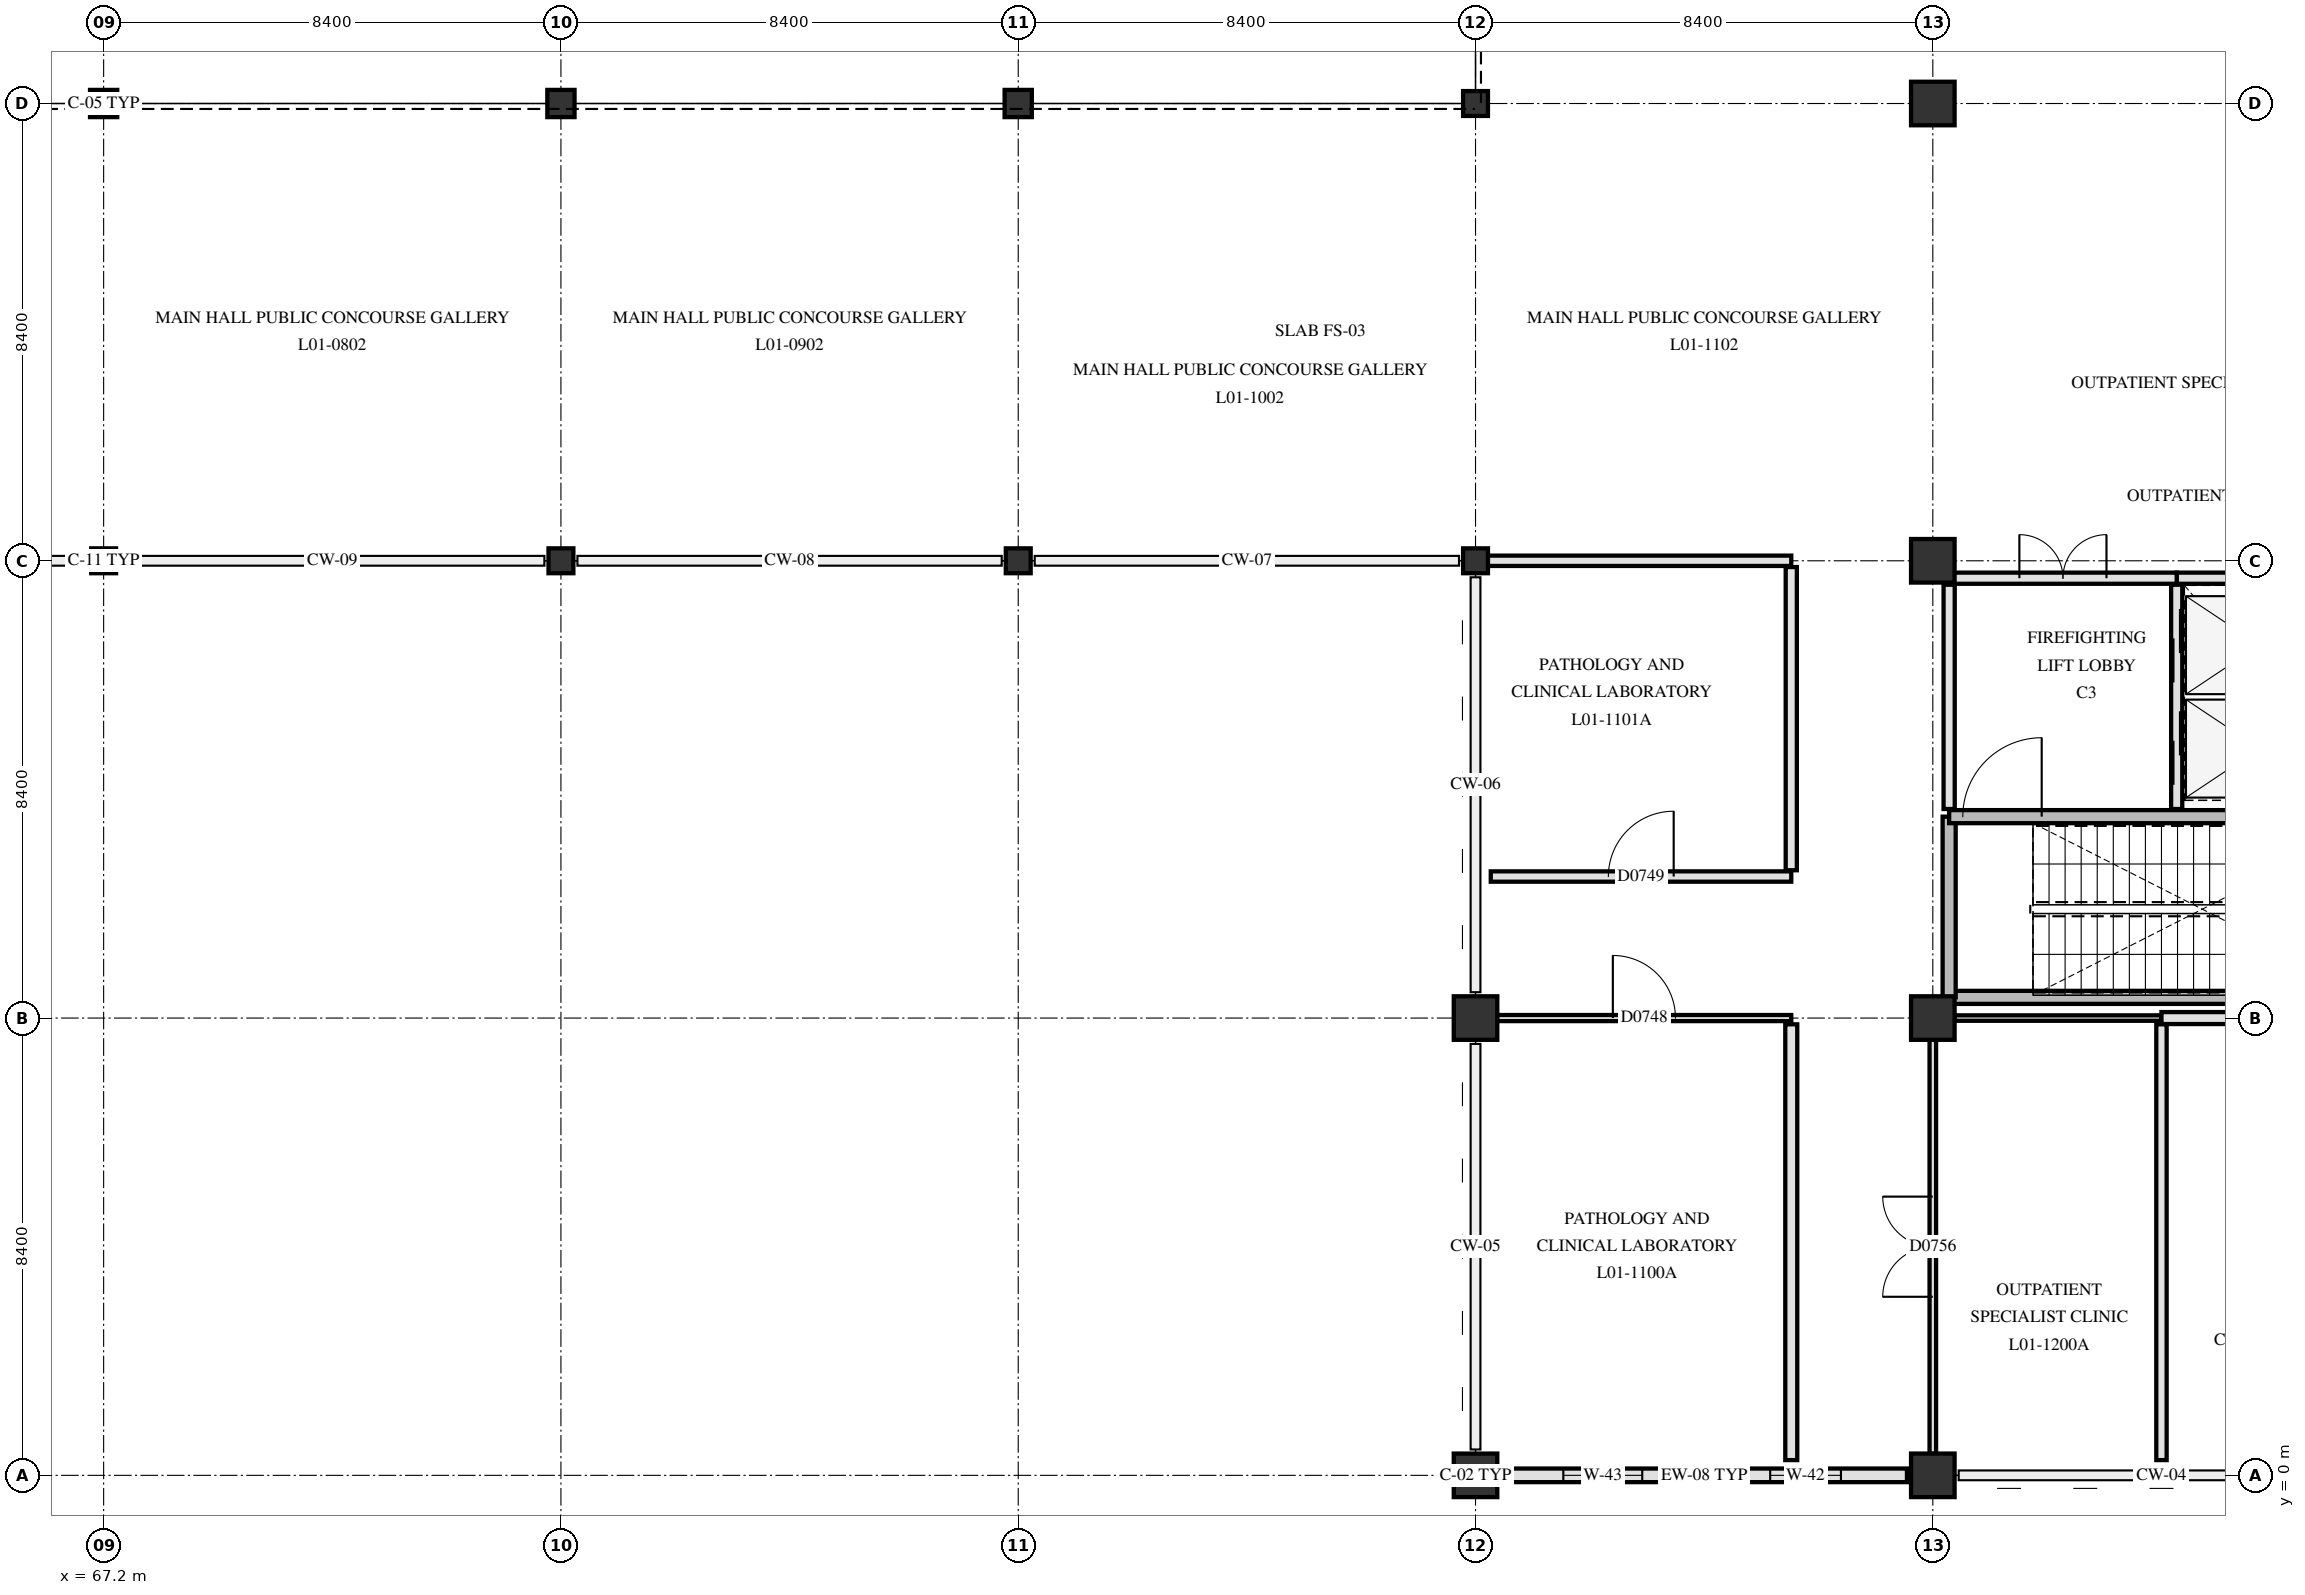
"""IFC4 building model, lengths in metres.
Left out: names, types, materials, properties, quantities, classifications, styles, units other than length and angle.
Written with IfcOpenShell. Run it as: python <this file> out.ifc"""

import sys

from ifc_helpers import new_model, si_unit, direction, frame, frame_2d, origin, origin_2d, place, context, subcontext, project, spatial, rectangle, hollow_circle, extrude, element, fill, save


model = new_model("IFC4")
c1 = context("Model", 3, precision=1e-05, world=origin(), true_north=direction((0.0, 1.0)))
c2 = subcontext(c1, "Body", "Model", "MODEL_VIEW")
j1 = project(units=[si_unit("LENGTHUNIT", "METRE"), si_unit("PLANEANGLEUNIT", "RADIAN")], contexts=[c1])
p1 = place(None, origin())
s1 = spatial("IfcSite", under=j1, at=p1, CompositionType="ELEMENT")
p2 = place(p1, origin())
s2 = spatial("IfcBuilding", under=s1, at=p2, CompositionType="ELEMENT")
p3 = place(p2, frame((0.0, 0.0, 4.8)))
s3 = spatial("IfcBuildingStorey", under=s2, at=p3, CompositionType="ELEMENT", Elevation=4.8)
p4 = place(p3, frame((67.2, 16.8, 0.0), z_axis=(0.0, 0.0, 1.0), x_axis=(1.0, 0.0, 0.0)))
e1 = element("IfcColumn", 1, at=p4, inside=s3, PredefinedType="COLUMN", context=c2, shape_type="SweptSolid", body=[
    extrude(hollow_circle(Radius=0.229, WallThickness=0.02, at=origin_2d()), origin(), (0.0, 0.0, 1.0), 4.5),
])
p5 = place(p3, frame((67.2, 25.2, 0.0), z_axis=(0.0, 0.0, 1.0), x_axis=(1.0, 0.0, 0.0)))
e2 = element("IfcColumn", 2, at=p5, inside=s3, PredefinedType="COLUMN", context=c2, shape_type="SweptSolid", body=[
    extrude(rectangle(XDim=0.5, YDim=0.5, at=origin_2d()), origin(), (0.0, 0.0, 1.0), 4.5),
])
p6 = place(p3, frame((75.6, 16.8, 0.0), z_axis=(0.0, 0.0, 1.0), x_axis=(1.0, 0.0, 0.0)))
e3 = element("IfcColumn", 3, at=p6, inside=s3, PredefinedType="COLUMN", context=c2, shape_type="SweptSolid", body=[
    extrude(hollow_circle(Radius=0.229, WallThickness=0.02, at=origin_2d()), origin(), (0.0, 0.0, 1.0), 4.5),
])
p7 = place(p3, frame((75.6, 25.2, 0.0), z_axis=(0.0, 0.0, 1.0), x_axis=(1.0, 0.0, 0.0)))
e4 = element("IfcColumn", 4, at=p7, inside=s3, PredefinedType="COLUMN", context=c2, shape_type="SweptSolid", body=[
    extrude(rectangle(XDim=0.5, YDim=0.5, at=origin_2d()), origin(), (0.0, 0.0, 1.0), 4.5),
])
p8 = place(p3, frame((84.0, 16.8, 0.0), z_axis=(0.0, 0.0, 1.0), x_axis=(1.0, 0.0, 0.0)))
e5 = element("IfcColumn", 5, at=p8, inside=s3, PredefinedType="COLUMN", context=c2, shape_type="SweptSolid", body=[
    extrude(hollow_circle(Radius=0.229, WallThickness=0.02, at=origin_2d()), origin(), (0.0, 0.0, 1.0), 4.5),
])
p9 = place(p3, frame((84.0, 25.2, 0.0), z_axis=(0.0, 0.0, 1.0), x_axis=(1.0, 0.0, 0.0)))
e6 = element("IfcColumn", 6, at=p9, inside=s3, PredefinedType="COLUMN", context=c2, shape_type="SweptSolid", body=[
    extrude(rectangle(XDim=0.5, YDim=0.5, at=origin_2d()), origin(), (0.0, 0.0, 1.0), 4.5),
])
for number, where, z_axis, x_axis in (
    (7, (92.4, 0.0, 0.0), (0.0, 0.0, 1.0), (1.0, 0.0, 0.0)),
    (8, (92.4, 8.4, 0.0), (0.0, 0.0, 1.0), (1.0, 0.0, 0.0)),
):
    element("IfcColumn", number, at=place(p3, frame(where, z_axis=z_axis, x_axis=x_axis)), inside=s3, PredefinedType="COLUMN", context=c2, shape_type="SweptSolid", body=[
        extrude(rectangle(XDim=0.8, YDim=0.8, at=origin_2d()), origin(), (0.0, 0.0, 1.0), 4.5),
    ])
for number, where, z_axis, x_axis in (
    (9, (92.4, 16.8, 0.0), (0.0, 0.0, 1.0), (1.0, 0.0, 0.0)),
    (10, (92.4, 25.2, 0.0), (0.0, 0.0, 1.0), (1.0, 0.0, 0.0)),
):
    element("IfcColumn", number, at=place(p3, frame(where, z_axis=z_axis, x_axis=x_axis)), inside=s3, PredefinedType="COLUMN", context=c2, shape_type="SweptSolid", body=[
        extrude(hollow_circle(Radius=0.229, WallThickness=0.02, at=origin_2d()), origin(), (0.0, 0.0, 1.0), 4.5),
    ])
for number, where, z_axis, x_axis in (
    (11, (100.8, 0.0, 0.0), (0.0, 0.0, 1.0), (1.0, 0.0, 0.0)),
    (12, (100.8, 8.4, 0.0), (0.0, 0.0, 1.0), (1.0, 0.0, 0.0)),
    (13, (100.8, 16.8, 0.0), (0.0, 0.0, 1.0), (1.0, 0.0, 0.0)),
    (14, (100.8, 25.2, 0.0), (0.0, 0.0, 1.0), (1.0, 0.0, 0.0)),
):
    element("IfcColumn", number, at=place(p3, frame(where, z_axis=z_axis, x_axis=x_axis)), inside=s3, PredefinedType="COLUMN", context=c2, shape_type="SweptSolid", body=[
        extrude(rectangle(XDim=0.8, YDim=0.8, at=origin_2d()), origin(), (0.0, 0.0, 1.0), 4.5),
    ])
p10 = place(p3, frame((100.325, 0.0, 0.0), z_axis=(0.0, 0.0, 1.0), x_axis=(-1.0, 0.0, 0.0)))
e15 = element("IfcWall", 15, at=p10, inside=s3, PredefinedType="SOLIDWALL", context=c2, shape_type="SweptSolid", body=[
    extrude(rectangle(XDim=7.45, YDim=0.25, at=frame_2d((3.725, 0.0))), origin(), (0.0, 0.0, 1.0), 3.44),
])
p11 = place(p10, frame((1.212, 0.0, 0.85)))
e16 = element("IfcOpeningElement", 16, at=p11, cuts=e15, PredefinedType="OPENING", context=c2, shape_type="SweptSolid", body=[
    extrude(rectangle(XDim=1.3, YDim=1.78, at=frame_2d((0.65, 0.89))), frame((0.0, 0.135, 0.0), z_axis=(0.0, -1.0, 0.0), x_axis=(1.0, 0.0, 0.0)), (0.0, 0.0, 1.0), 0.27),
])
p12 = place(p10, frame((4.863, 0.0, 0.85)))
e17 = element("IfcOpeningElement", 17, at=p12, cuts=e15, PredefinedType="OPENING", context=c2, shape_type="SweptSolid", body=[
    extrude(rectangle(XDim=1.45, YDim=1.78, at=frame_2d((0.725, 0.89))), frame((0.0, 0.135, 0.0), z_axis=(0.0, -1.0, 0.0), x_axis=(1.0, 0.0, 0.0)), (0.0, 0.0, 1.0), 0.27),
])
p13 = place(p3, frame((101.1, 8.78, 0.0), z_axis=(0.0, 0.0, 1.0), x_axis=(1.0, 0.0, 0.0)))
e18 = element("IfcWall", 18, at=p13, inside=s3, PredefinedType="SHEAR", context=c2, shape_type="SweptSolid", body=[
    extrude(rectangle(XDim=7.82, YDim=0.24, at=frame_2d((3.91, 0.0))), origin(), (0.0, 0.0, 1.0), 4.15),
])
p14 = place(p3, frame((101.1, 8.78, 0.0), z_axis=(0.0, 0.0, 1.0), x_axis=(0.0, 1.0, 0.0)))
e19 = element("IfcWall", 19, at=p14, inside=s3, PredefinedType="SHEAR", context=c2, shape_type="SweptSolid", body=[
    extrude(rectangle(XDim=3.32, YDim=0.24, at=frame_2d((1.66, 0.0))), origin(), (0.0, 0.0, 1.0), 4.15),
])
p15 = place(p3, frame((101.1, 12.1, 0.0), z_axis=(0.0, 0.0, 1.0), x_axis=(1.0, 0.0, 0.0)))
e20 = element("IfcWall", 20, at=p15, inside=s3, PredefinedType="SHEAR", context=c2, shape_type="SweptSolid", body=[
    extrude(rectangle(XDim=7.82, YDim=0.24, at=frame_2d((3.91, 0.0))), origin(), (0.0, 0.0, 1.0), 4.15),
])
p16 = place(p15, frame((0.25, 0.0, 0.0)))
e21 = element("IfcOpeningElement", 21, at=p16, cuts=e20, PredefinedType="OPENING", context=c2, shape_type="SweptSolid", body=[
    extrude(rectangle(XDim=1.45, YDim=2.2, at=frame_2d((0.725, 1.1))), frame((0.0, 0.13, 0.0), z_axis=(0.0, -1.0, 0.0), x_axis=(1.0, 0.0, 0.0)), (0.0, 0.0, 1.0), 0.26),
])
p17 = place(p3, frame((105.28, 12.24, 0.0), z_axis=(0.0, 0.0, 1.0), x_axis=(0.0, 1.0, 0.0)))
e22 = element("IfcWall", 22, at=p17, inside=s3, PredefinedType="PARTITIONING", context=c2, shape_type="SweptSolid", body=[
    extrude(rectangle(XDim=4.12, YDim=0.205, at=frame_2d((2.06, 0.0))), origin(), (0.0, 0.0, 1.0), 4.14),
])
p18 = place(p17, frame((0.445, 0.0, 0.0)))
e23 = element("IfcOpeningElement", 23, at=p18, cuts=e22, PredefinedType="OPENING", context=c2, shape_type="SweptSolid", body=[
    extrude(rectangle(XDim=1.35, YDim=2.2, at=frame_2d((0.675, 1.1))), frame((0.0, 0.113, 0.0), z_axis=(0.0, -1.0, 0.0), x_axis=(1.0, 0.0, 0.0)), (0.0, 0.0, 1.0), 0.225),
])
p19 = place(p17, frame((2.325, 0.0, 0.0)))
e24 = element("IfcOpeningElement", 24, at=p19, cuts=e22, PredefinedType="OPENING", context=c2, shape_type="SweptSolid", body=[
    extrude(rectangle(XDim=1.35, YDim=2.2, at=frame_2d((0.675, 1.1))), frame((0.0, 0.113, 0.0), z_axis=(0.0, -1.0, 0.0), x_axis=(1.0, 0.0, 0.0)), (0.0, 0.0, 1.0), 0.225),
])
p20 = place(p3, frame((105.28, 16.48, 0.0), z_axis=(0.0, 0.0, 1.0), x_axis=(1.0, 0.0, 0.0)))
e25 = element("IfcWall", 25, at=p20, inside=s3, PredefinedType="PARTITIONING", context=c2, shape_type="SweptSolid", body=[
    extrude(rectangle(XDim=3.57, YDim=0.205, at=frame_2d((1.785, 0.0))), origin(), (0.0, 0.0, 1.0), 4.14),
])
p21 = place(p3, frame((101.1, 12.24, 0.0), z_axis=(0.0, 0.0, 1.0), x_axis=(0.0, 1.0, 0.0)))
e26 = element("IfcWall", 26, at=p21, inside=s3, PredefinedType="PARTITIONING", context=c2, shape_type="SweptSolid", body=[
    extrude(rectangle(XDim=4.12, YDim=0.205, at=frame_2d((2.06, 0.0))), origin(), (0.0, 0.0, 1.0), 3.59),
])
p22 = place(p3, frame((101.1, 16.48, 0.0), z_axis=(0.0, 0.0, 1.0), x_axis=(1.0, 0.0, 0.0)))
e27 = element("IfcWall", 27, at=p22, inside=s3, PredefinedType="PARTITIONING", context=c2, shape_type="SweptSolid", body=[
    extrude(rectangle(XDim=4.18, YDim=0.205, at=frame_2d((2.09, 0.0))), origin(), (0.0, 0.0, 1.0), 4.14),
])
p23 = place(p22, frame((1.29, 0.0, 0.0)))
e28 = element("IfcOpeningElement", 28, at=p23, cuts=e27, PredefinedType="OPENING", context=c2, shape_type="SweptSolid", body=[
    extrude(rectangle(XDim=1.6, YDim=2.25, at=frame_2d((0.8, 1.125))), frame((0.0, 0.113, 0.0), z_axis=(0.0, -1.0, 0.0), x_axis=(1.0, 0.0, 0.0)), (0.0, 0.0, 1.0), 0.225),
])
p24 = place(p3, frame((92.795, 8.4, 0.0), z_axis=(0.0, 0.0, 1.0), x_axis=(1.0, 0.0, 0.0)))
e29 = element("IfcWall", 29, at=p24, inside=s3, PredefinedType="PARTITIONING", context=c2, shape_type="SweptSolid", body=[
    extrude(rectangle(XDim=5.405, YDim=0.112, at=frame_2d((2.703, 0.0))), origin(), (0.0, 0.0, 1.0), 3.54),
])
p25 = place(p24, frame((2.127, 0.0, 0.0)))
e30 = element("IfcOpeningElement", 30, at=p25, cuts=e29, PredefinedType="OPENING", context=c2, shape_type="SweptSolid", body=[
    extrude(rectangle(XDim=1.15, YDim=2.15, at=frame_2d((0.575, 1.075))), frame((0.0, 0.066, 0.0), z_axis=(0.0, -1.0, 0.0), x_axis=(1.0, 0.0, 0.0)), (0.0, 0.0, 1.0), 0.132),
])
p26 = place(p3, frame((101.195, 8.4, 0.0), z_axis=(0.0, 0.0, 1.0), x_axis=(1.0, 0.0, 0.0)))
e31 = element("IfcWall", 31, at=p26, inside=s3, PredefinedType="PARTITIONING", context=c2, shape_type="SweptSolid", body=[
    extrude(rectangle(XDim=3.805, YDim=0.1, at=frame_2d((1.902, 0.0))), origin(), (0.0, 0.0, 1.0), 3.54),
])
p27 = place(p3, frame((105.0, 8.4, 0.0), z_axis=(0.0, 0.0, 1.0), x_axis=(1.0, 0.0, 0.0)))
e32 = element("IfcWall", 32, at=p27, inside=s3, PredefinedType="PARTITIONING", context=c2, shape_type="SweptSolid", body=[
    extrude(rectangle(XDim=3.805, YDim=0.22, at=frame_2d((1.902, 0.0))), origin(), (0.0, 0.0, 1.0), 3.54),
])
p28 = place(p3, frame((92.68, 11.0, 0.0), z_axis=(0.0, 0.0, 1.0), x_axis=(1.0, 0.0, 0.0)))
e33 = element("IfcWall", 33, at=p28, inside=s3, PredefinedType="PARTITIONING", context=c2, shape_type="SweptSolid", body=[
    extrude(rectangle(XDim=5.52, YDim=0.19, at=frame_2d((2.76, 0.0))), origin(), (0.0, 0.0, 1.0), 4.14),
])
p29 = place(p28, frame((2.16, 0.0, 0.0)))
e34 = element("IfcOpeningElement", 34, at=p29, cuts=e33, PredefinedType="OPENING", context=c2, shape_type="SweptSolid", body=[
    extrude(rectangle(XDim=1.2, YDim=2.15, at=frame_2d((0.6, 1.075))), frame((0.0, 0.105, 0.0), z_axis=(0.0, -1.0, 0.0), x_axis=(1.0, 0.0, 0.0)), (0.0, 0.0, 1.0), 0.21),
])
p30 = place(p3, frame((92.624, 16.8, 0.0), z_axis=(0.0, 0.0, 1.0), x_axis=(1.0, 0.0, 0.0)))
e35 = element("IfcWall", 35, at=p30, inside=s3, PredefinedType="PARTITIONING", context=c2, shape_type="SweptSolid", body=[
    extrude(rectangle(XDim=5.576, YDim=0.19, at=frame_2d((2.788, 0.0))), origin(), (0.0, 0.0, 1.0), 3.75),
])
p31 = place(p3, frame((98.2, 0.28, 0.0), z_axis=(0.0, 0.0, 1.0), x_axis=(0.0, 1.0, 0.0)))
e36 = element("IfcWall", 36, at=p31, inside=s3, PredefinedType="PARTITIONING", context=c2, shape_type="SweptSolid", body=[
    extrude(rectangle(XDim=8.005, YDim=0.22, at=frame_2d((4.002, 0.0))), origin(), (0.0, 0.0, 1.0), 3.54),
])
p32 = place(p3, frame((98.2, 11.115, 0.0), z_axis=(0.0, 0.0, 1.0), x_axis=(0.0, 1.0, 0.0)))
e37 = element("IfcWall", 37, at=p32, inside=s3, PredefinedType="PARTITIONING", context=c2, shape_type="SweptSolid", body=[
    extrude(rectangle(XDim=5.57, YDim=0.205, at=frame_2d((2.785, 0.0))), origin(), (0.0, 0.0, 1.0), 3.75),
])
p33 = place(p3, frame((100.8, 0.395, 0.0), z_axis=(0.0, 0.0, 1.0), x_axis=(0.0, 1.0, 0.0)))
e38 = element("IfcWall", 38, at=p33, inside=s3, PredefinedType="PARTITIONING", context=c2, shape_type="SweptSolid", body=[
    extrude(rectangle(XDim=7.61, YDim=0.12, at=frame_2d((3.805, 0.0))), origin(), (0.0, 0.0, 1.0), 3.59),
])
p34 = place(p33, frame((2.885, 0.0, 0.0)))
e39 = element("IfcOpeningElement", 39, at=p34, cuts=e38, PredefinedType="OPENING", context=c2, shape_type="SweptSolid", body=[
    extrude(rectangle(XDim=1.84, YDim=2.28, at=frame_2d((0.92, 1.14))), frame((0.0, 0.07, 0.0), z_axis=(0.0, -1.0, 0.0), x_axis=(1.0, 0.0, 0.0)), (0.0, 0.0, 1.0), 0.14),
])
p35 = place(p3, frame((105.0, 0.28, 0.0), z_axis=(0.0, 0.0, 1.0), x_axis=(0.0, 1.0, 0.0)))
e40 = element("IfcWall", 40, at=p35, inside=s3, PredefinedType="PARTITIONING", context=c2, shape_type="SweptSolid", body=[
    extrude(rectangle(XDim=8.005, YDim=0.19, at=frame_2d((4.002, 0.0))), origin(), (0.0, 0.0, 1.0), 3.54),
])
p36 = place(p11, origin())
e41 = element("IfcWindow", 41, at=p36, inside=s3, PartitioningType="SINGLE_PANEL", PredefinedType="WINDOW", context=c2, shape_type="SweptSolid", body=[
    extrude(rectangle(XDim=1.3, YDim=1.78, at=frame_2d((0.65, 0.89))), frame((0.0, 0.03, 0.0), z_axis=(0.0, -1.0, 0.0), x_axis=(1.0, 0.0, 0.0)), (0.0, 0.0, 1.0), 0.06),
])
fill(e16, e41)
p37 = place(p12, origin())
e42 = element("IfcWindow", 42, at=p37, inside=s3, PartitioningType="SINGLE_PANEL", PredefinedType="WINDOW", context=c2, shape_type="SweptSolid", body=[
    extrude(rectangle(XDim=1.45, YDim=1.78, at=frame_2d((0.725, 0.89))), frame((0.0, 0.03, 0.0), z_axis=(0.0, -1.0, 0.0), x_axis=(1.0, 0.0, 0.0)), (0.0, 0.0, 1.0), 0.06),
])
fill(e17, e42)
p38 = place(p16, origin())
e43 = element("IfcDoor", 43, at=p38, inside=s3, OperationType="SINGLE_SWING_RIGHT", PredefinedType="DOOR", context=c2, shape_type="SweptSolid", body=[
    extrude(rectangle(XDim=1.45, YDim=2.2, at=frame_2d((0.725, 1.1))), frame((0.0, 0.025, 0.0), z_axis=(0.0, -1.0, 0.0), x_axis=(1.0, 0.0, 0.0)), (0.0, 0.0, 1.0), 0.05),
])
fill(e21, e43)
p39 = place(p18, origin())
e44 = element("IfcDoor", 44, at=p39, inside=s3, OperationType="SLIDING_TO_LEFT", PredefinedType="DOOR", context=c2, shape_type="SweptSolid", body=[
    extrude(rectangle(XDim=1.35, YDim=2.2, at=frame_2d((0.675, 1.1))), frame((0.0, 0.025, 0.0), z_axis=(0.0, -1.0, 0.0), x_axis=(1.0, 0.0, 0.0)), (0.0, 0.0, 1.0), 0.05),
])
fill(e23, e44)
p40 = place(p19, origin())
e45 = element("IfcDoor", 45, at=p40, inside=s3, OperationType="SLIDING_TO_LEFT", PredefinedType="DOOR", context=c2, shape_type="SweptSolid", body=[
    extrude(rectangle(XDim=1.35, YDim=2.2, at=frame_2d((0.675, 1.1))), frame((0.0, 0.025, 0.0), z_axis=(0.0, -1.0, 0.0), x_axis=(1.0, 0.0, 0.0)), (0.0, 0.0, 1.0), 0.05),
])
fill(e24, e45)
p41 = place(p23, origin())
e46 = element("IfcDoor", 46, at=p41, inside=s3, OperationType="DOUBLE_SWING_LEFT", PredefinedType="DOOR", context=c2, shape_type="SweptSolid", body=[
    extrude(rectangle(XDim=1.6, YDim=2.25, at=frame_2d((0.8, 1.125))), frame((0.0, 0.025, 0.0), z_axis=(0.0, -1.0, 0.0), x_axis=(1.0, 0.0, 0.0)), (0.0, 0.0, 1.0), 0.05),
])
fill(e28, e46)
p42 = place(p25, origin())
e47 = element("IfcDoor", 47, at=p42, inside=s3, OperationType="SINGLE_SWING_LEFT", PredefinedType="DOOR", context=c2, shape_type="SweptSolid", body=[
    extrude(rectangle(XDim=1.15, YDim=2.15, at=frame_2d((0.575, 1.075))), frame((0.0, 0.025, 0.0), z_axis=(0.0, -1.0, 0.0), x_axis=(1.0, 0.0, 0.0)), (0.0, 0.0, 1.0), 0.05),
])
fill(e30, e47)
p43 = place(p29, origin())
e48 = element("IfcDoor", 48, at=p43, inside=s3, OperationType="SINGLE_SWING_RIGHT", PredefinedType="DOOR", context=c2, shape_type="SweptSolid", body=[
    extrude(rectangle(XDim=1.2, YDim=2.15, at=frame_2d((0.6, 1.075))), frame((0.0, 0.025, 0.0), z_axis=(0.0, -1.0, 0.0), x_axis=(1.0, 0.0, 0.0)), (0.0, 0.0, 1.0), 0.05),
])
fill(e34, e48)
p44 = place(p34, origin())
e49 = element("IfcDoor", 49, at=p44, inside=s3, OperationType="DOUBLE_SWING_LEFT", PredefinedType="DOOR", context=c2, shape_type="SweptSolid", body=[
    extrude(rectangle(XDim=1.84, YDim=2.28, at=frame_2d((0.92, 1.14))), frame((0.0, 0.025, 0.0), z_axis=(0.0, -1.0, 0.0), x_axis=(1.0, 0.0, 0.0)), (0.0, 0.0, 1.0), 0.05),
])
fill(e39, e49)
save(model, sys.argv[1])
